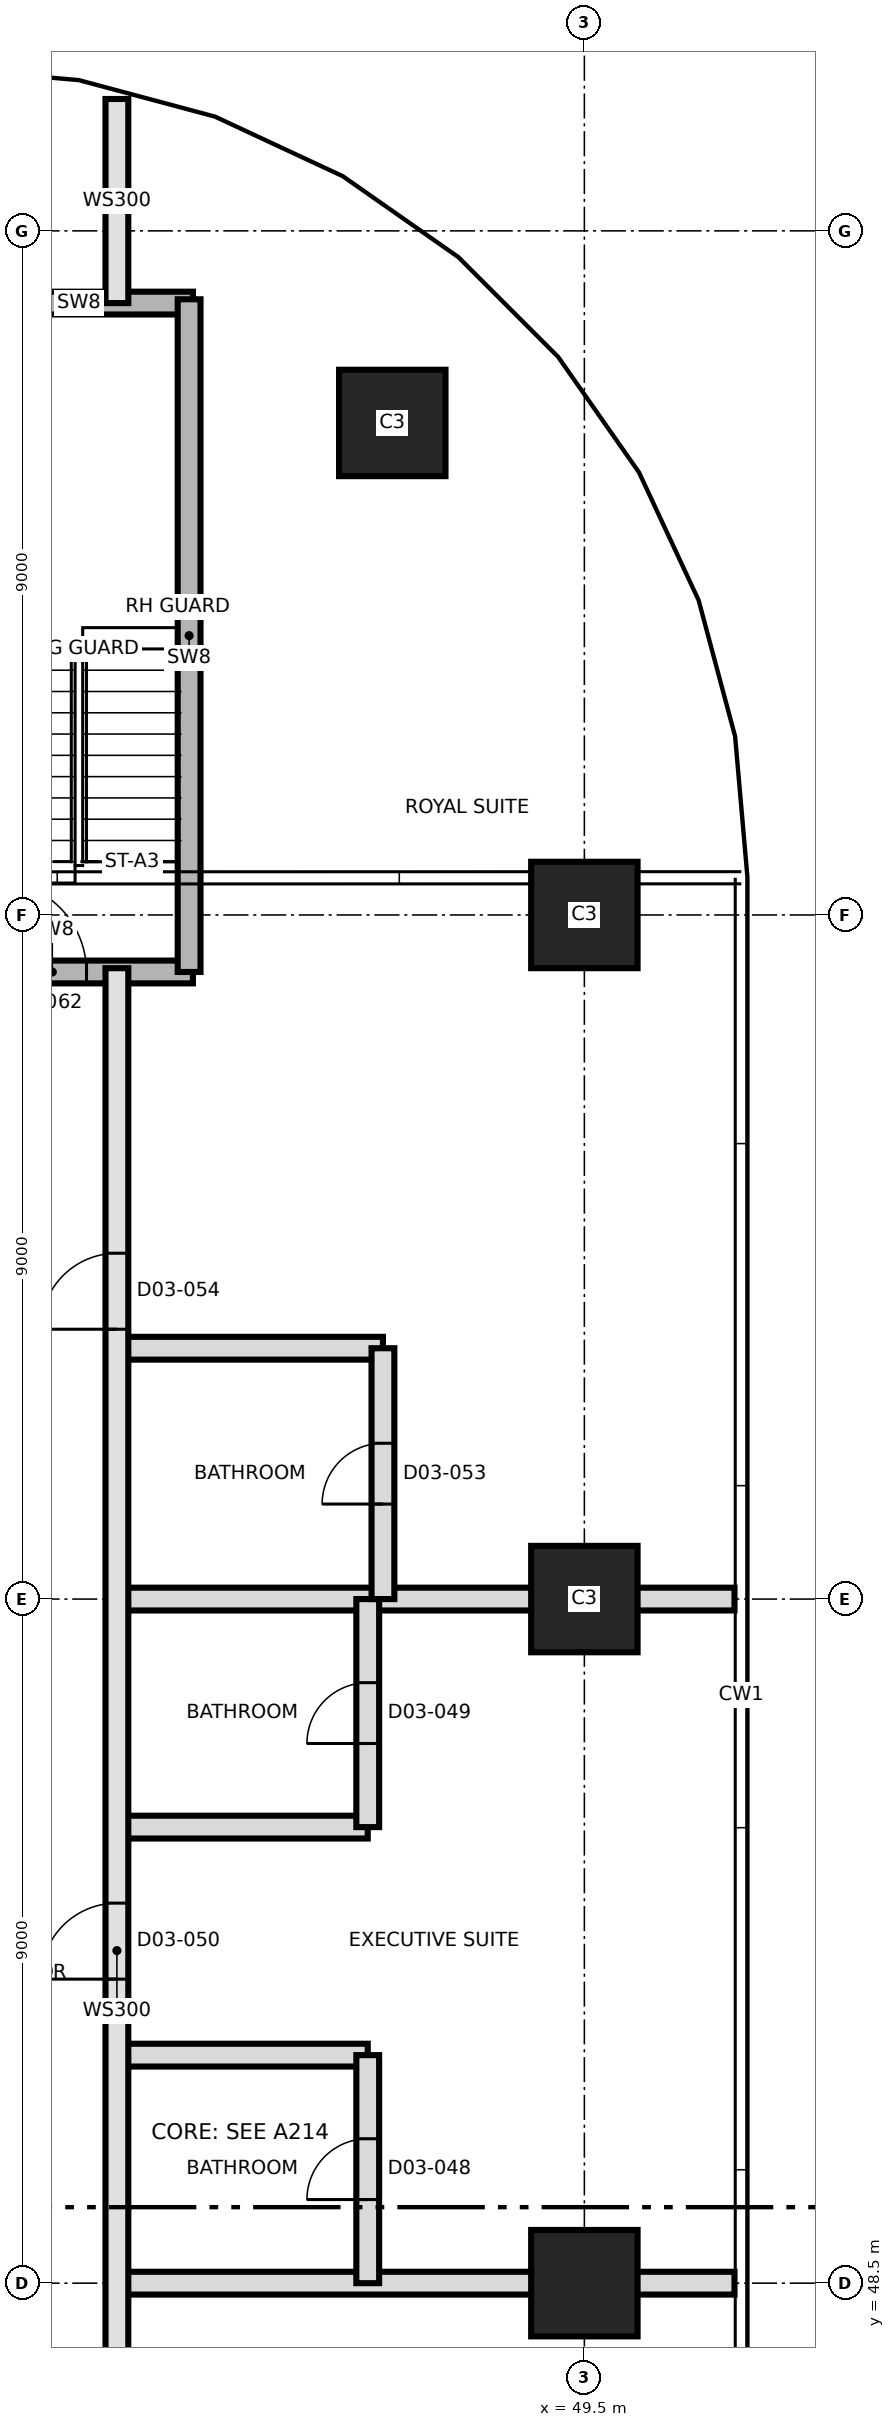
"""IFC4 building model, lengths in metres.
Left out: names, types, materials, properties, quantities, classifications, styles, units other than length and angle.
Written with IfcOpenShell. Run it as: python <this file> out.ifc"""

import sys

from ifc_helpers import new_model, si_unit, direction, frame, frame_2d, origin, origin_2d, place, context, subcontext, project, spatial, rectangle, extrude, element, fill, save


model = new_model("IFC4")
c1 = context("Model", 3, precision=1e-05, world=origin(), true_north=direction((0.0, 1.0)))
c2 = subcontext(c1, "Body", "Model", "MODEL_VIEW")
j1 = project(units=[si_unit("LENGTHUNIT", "METRE"), si_unit("PLANEANGLEUNIT", "RADIAN")], contexts=[c1])
p1 = place(None, origin())
s1 = spatial("IfcSite", under=j1, at=p1, CompositionType="ELEMENT")
p2 = place(p1, origin())
s2 = spatial("IfcBuilding", under=s1, at=p2, CompositionType="ELEMENT")
p3 = place(p2, frame((0.0, 0.0, 52.0)))
s3 = spatial("IfcBuildingStorey", under=s2, at=p3, CompositionType="ELEMENT", Elevation=52.0)
for number, where, z_axis, x_axis in (
    (1, (49.5, 48.5, 0.0), (0.0, 0.0, 1.0), (1.0, 0.0, 0.0)),
    (2, (49.5, 57.5, 0.0), (0.0, 0.0, 1.0), (1.0, 0.0, 0.0)),
    (3, (49.5, 66.5, 0.0), (0.0, 0.0, 1.0), (1.0, 0.0, 0.0)),
    (4, (46.973, 72.973, 0.0), (0.0, 0.0, 1.0), (1.0, 0.0, 0.0)),
):
    element("IfcColumn", number, at=place(p3, frame(where, z_axis=z_axis, x_axis=x_axis)), inside=s3, PredefinedType="COLUMN", context=c2, shape_type="SweptSolid", body=[
        extrude(rectangle(XDim=1.4, YDim=1.4, at=origin_2d()), origin(), (0.0, 0.0, 1.0), 3.7),
    ])
p4 = place(p3, frame((43.35, 48.5, 0.0), z_axis=(0.0, 0.0, 1.0), x_axis=(1.0, 0.0, 0.0)))
e5 = element("IfcWall", 5, at=p4, inside=s3, PredefinedType="PARTITIONING", context=c2, shape_type="SweptSolid", body=[
    extrude(rectangle(XDim=8.125, YDim=0.3, at=frame_2d((4.062, 0.0))), origin(), (0.0, 0.0, 1.0), 3.4),
])
for number, where, z_axis, x_axis in (
    (6, (43.35, 51.5, 0.0), (0.0, 0.0, 1.0), (1.0, 0.0, 0.0)),
    (7, (43.35, 54.5, 0.0), (0.0, 0.0, 1.0), (1.0, 0.0, 0.0)),
):
    element("IfcWall", number, at=place(p3, frame(where, z_axis=z_axis, x_axis=x_axis)), inside=s3, PredefinedType="PARTITIONING", context=c2, shape_type="SweptSolid", body=[
        extrude(rectangle(XDim=3.3, YDim=0.3, at=frame_2d((1.65, 0.0))), origin(), (0.0, 0.0, 1.0), 3.4),
    ])
p5 = place(p3, frame((43.35, 57.5, 0.0), z_axis=(0.0, 0.0, 1.0), x_axis=(1.0, 0.0, 0.0)))
e8 = element("IfcWall", 8, at=p5, inside=s3, PredefinedType="PARTITIONING", context=c2, shape_type="SweptSolid", body=[
    extrude(rectangle(XDim=8.125, YDim=0.3, at=frame_2d((4.062, 0.0))), origin(), (0.0, 0.0, 1.0), 3.4),
])
p6 = place(p3, frame((43.35, 60.8, 0.0), z_axis=(0.0, 0.0, 1.0), x_axis=(1.0, 0.0, 0.0)))
e9 = element("IfcWall", 9, at=p6, inside=s3, PredefinedType="PARTITIONING", context=c2, shape_type="SweptSolid", body=[
    extrude(rectangle(XDim=3.5, YDim=0.3, at=frame_2d((1.75, 0.0))), origin(), (0.0, 0.0, 1.0), 3.4),
])
p7 = place(p3, frame((40.65, 65.75, 0.0), z_axis=(0.0, 0.0, 1.0), x_axis=(1.0, 0.0, 0.0)))
e10 = element("IfcWall", 10, at=p7, inside=s3, PredefinedType="SHEAR", context=c2, shape_type="SweptSolid", body=[
    extrude(rectangle(XDim=3.7, YDim=0.3, at=frame_2d((1.85, 0.0))), origin(), (0.0, 0.0, 1.0), 3.4),
])
p8 = place(p7, frame((1.1, 0.0, 0.0)))
e11 = element("IfcOpeningElement", 11, at=p8, cuts=e10, PredefinedType="OPENING", context=c2, shape_type="SweptSolid", body=[
    extrude(rectangle(XDim=1.2, YDim=2.1, at=frame_2d((0.6, 1.05))), frame((0.0, 0.16, 0.0), z_axis=(0.0, -1.0, 0.0), x_axis=(1.0, 0.0, 0.0)), (0.0, 0.0, 1.0), 0.32),
])
p9 = place(p3, frame((41.35, 74.55, 0.0), z_axis=(0.0, 0.0, 1.0), x_axis=(1.0, 0.0, 0.0)))
e12 = element("IfcWall", 12, at=p9, inside=s3, PredefinedType="SHEAR", context=c2, shape_type="SweptSolid", body=[
    extrude(rectangle(XDim=3.0, YDim=0.3, at=frame_2d((1.5, 0.0))), origin(), (0.0, 0.0, 1.0), 3.4),
])
p10 = place(p3, frame((43.35, 39.95, 0.0), z_axis=(0.0, 0.0, 1.0), x_axis=(0.0, 1.0, 0.0)))
e13 = element("IfcWall", 13, at=p10, inside=s3, PredefinedType="SOLIDWALL", context=c2, shape_type="SweptSolid", body=[
    extrude(rectangle(XDim=25.85, YDim=0.3, at=frame_2d((12.925, 0.0))), origin(), (0.0, 0.0, 1.0), 3.4),
])
p11 = place(p10, frame((0.7, 0.0, 0.0)))
e14 = element("IfcOpeningElement", 14, at=p11, cuts=e13, PredefinedType="OPENING", context=c2, shape_type="SweptSolid", body=[
    extrude(rectangle(XDim=1.0, YDim=2.1, at=frame_2d((0.5, 1.05))), frame((0.0, 0.16, 0.0), z_axis=(0.0, -1.0, 0.0), x_axis=(1.0, 0.0, 0.0)), (0.0, 0.0, 1.0), 0.32),
])
p12 = place(p10, frame((6.55, 0.0, 0.0)))
e15 = element("IfcOpeningElement", 15, at=p12, cuts=e13, PredefinedType="OPENING", context=c2, shape_type="SweptSolid", body=[
    extrude(rectangle(XDim=1.0, YDim=2.1, at=frame_2d((0.5, 1.05))), frame((0.0, 0.16, 0.0), z_axis=(0.0, -1.0, 0.0), x_axis=(1.0, 0.0, 0.0)), (0.0, 0.0, 1.0), 0.32),
])
p13 = place(p10, frame((12.55, 0.0, 0.0)))
e16 = element("IfcOpeningElement", 16, at=p13, cuts=e13, PredefinedType="OPENING", context=c2, shape_type="SweptSolid", body=[
    extrude(rectangle(XDim=1.0, YDim=2.4, at=frame_2d((0.5, 1.2))), frame((0.0, 0.16, 0.0), z_axis=(0.0, -1.0, 0.0), x_axis=(1.0, 0.0, 0.0)), (0.0, 0.0, 1.0), 0.32),
])
p14 = place(p10, frame((21.1, 0.0, 0.0)))
e17 = element("IfcOpeningElement", 17, at=p14, cuts=e13, PredefinedType="OPENING", context=c2, shape_type="SweptSolid", body=[
    extrude(rectangle(XDim=1.0, YDim=2.4, at=frame_2d((0.5, 1.2))), frame((0.0, 0.16, 0.0), z_axis=(0.0, -1.0, 0.0), x_axis=(1.0, 0.0, 0.0)), (0.0, 0.0, 1.0), 0.32),
])
p15 = place(p3, frame((43.35, 74.55, 0.0), z_axis=(0.0, 0.0, 1.0), x_axis=(0.0, 1.0, 0.0)))
e18 = element("IfcWall", 18, at=p15, inside=s3, PredefinedType="SOLIDWALL", context=c2, shape_type="SweptSolid", body=[
    extrude(rectangle(XDim=2.685, YDim=0.3, at=frame_2d((1.343, 0.0))), origin(), (0.0, 0.0, 1.0), 3.4),
])
p16 = place(p3, frame((44.3, 65.75, 0.0), z_axis=(0.0, 0.0, 1.0), x_axis=(0.0, 1.0, 0.0)))
e19 = element("IfcWall", 19, at=p16, inside=s3, PredefinedType="SHEAR", context=c2, shape_type="SweptSolid", body=[
    extrude(rectangle(XDim=8.85, YDim=0.3, at=frame_2d((4.425, 0.0))), origin(), (0.0, 0.0, 1.0), 3.4),
])
p17 = place(p3, frame((46.65, 48.5, 0.0), z_axis=(0.0, 0.0, 1.0), x_axis=(0.0, 1.0, 0.0)))
e20 = element("IfcWall", 20, at=p17, inside=s3, PredefinedType="PARTITIONING", context=c2, shape_type="SweptSolid", body=[
    extrude(rectangle(XDim=3.0, YDim=0.3, at=frame_2d((1.5, 0.0))), origin(), (0.0, 0.0, 1.0), 3.4),
])
p18 = place(p17, frame((1.1, 0.0, 0.0)))
e21 = element("IfcOpeningElement", 21, at=p18, cuts=e20, PredefinedType="OPENING", context=c2, shape_type="SweptSolid", body=[
    extrude(rectangle(XDim=0.8, YDim=2.1, at=frame_2d((0.4, 1.05))), frame((0.0, 0.16, 0.0), z_axis=(0.0, -1.0, 0.0), x_axis=(1.0, 0.0, 0.0)), (0.0, 0.0, 1.0), 0.32),
])
p19 = place(p3, frame((46.65, 54.5, 0.0), z_axis=(0.0, 0.0, 1.0), x_axis=(0.0, 1.0, 0.0)))
e22 = element("IfcWall", 22, at=p19, inside=s3, PredefinedType="PARTITIONING", context=c2, shape_type="SweptSolid", body=[
    extrude(rectangle(XDim=3.0, YDim=0.3, at=frame_2d((1.5, 0.0))), origin(), (0.0, 0.0, 1.0), 3.4),
])
p20 = place(p19, frame((1.1, 0.0, 0.0)))
e23 = element("IfcOpeningElement", 23, at=p20, cuts=e22, PredefinedType="OPENING", context=c2, shape_type="SweptSolid", body=[
    extrude(rectangle(XDim=0.8, YDim=2.1, at=frame_2d((0.4, 1.05))), frame((0.0, 0.16, 0.0), z_axis=(0.0, -1.0, 0.0), x_axis=(1.0, 0.0, 0.0)), (0.0, 0.0, 1.0), 0.32),
])
p21 = place(p3, frame((46.85, 57.5, 0.0), z_axis=(0.0, 0.0, 1.0), x_axis=(0.0, 1.0, 0.0)))
e24 = element("IfcWall", 24, at=p21, inside=s3, PredefinedType="PARTITIONING", context=c2, shape_type="SweptSolid", body=[
    extrude(rectangle(XDim=3.3, YDim=0.3, at=frame_2d((1.65, 0.0))), origin(), (0.0, 0.0, 1.0), 3.4),
])
p22 = place(p21, frame((1.25, 0.0, 0.0)))
e25 = element("IfcOpeningElement", 25, at=p22, cuts=e24, PredefinedType="OPENING", context=c2, shape_type="SweptSolid", body=[
    extrude(rectangle(XDim=0.8, YDim=2.1, at=frame_2d((0.4, 1.05))), frame((0.0, 0.16, 0.0), z_axis=(0.0, -1.0, 0.0), x_axis=(1.0, 0.0, 0.0)), (0.0, 0.0, 1.0), 0.32),
])
p23 = place(p18, origin())
e26 = element("IfcDoor", 26, at=p23, inside=s3, OperationType="SINGLE_SWING_RIGHT", PredefinedType="DOOR", context=c2, shape_type="SweptSolid", body=[
    extrude(rectangle(XDim=0.8, YDim=2.1, at=frame_2d((0.4, 1.05))), frame((0.0, 0.025, 0.0), z_axis=(0.0, -1.0, 0.0), x_axis=(1.0, 0.0, 0.0)), (0.0, 0.0, 1.0), 0.05),
])
fill(e21, e26)
p24 = place(p20, origin())
e27 = element("IfcDoor", 27, at=p24, inside=s3, OperationType="SINGLE_SWING_LEFT", PredefinedType="DOOR", context=c2, shape_type="SweptSolid", body=[
    extrude(rectangle(XDim=0.8, YDim=2.1, at=frame_2d((0.4, 1.05))), frame((0.0, 0.025, 0.0), z_axis=(0.0, -1.0, 0.0), x_axis=(1.0, 0.0, 0.0)), (0.0, 0.0, 1.0), 0.05),
])
fill(e23, e27)
p25 = place(p13, origin())
e28 = element("IfcDoor", 28, at=p25, inside=s3, OperationType="SINGLE_SWING_LEFT", PredefinedType="DOOR", context=c2, shape_type="SweptSolid", body=[
    extrude(rectangle(XDim=1.0, YDim=2.4, at=frame_2d((0.5, 1.2))), frame((0.0, 0.025, 0.0), z_axis=(0.0, -1.0, 0.0), x_axis=(1.0, 0.0, 0.0)), (0.0, 0.0, 1.0), 0.05),
])
fill(e16, e28)
p26 = place(p22, origin())
e29 = element("IfcDoor", 29, at=p26, inside=s3, OperationType="SINGLE_SWING_LEFT", PredefinedType="DOOR", context=c2, shape_type="SweptSolid", body=[
    extrude(rectangle(XDim=0.8, YDim=2.1, at=frame_2d((0.4, 1.05))), frame((0.0, 0.025, 0.0), z_axis=(0.0, -1.0, 0.0), x_axis=(1.0, 0.0, 0.0)), (0.0, 0.0, 1.0), 0.05),
])
fill(e25, e29)
p27 = place(p14, origin())
e30 = element("IfcDoor", 30, at=p27, inside=s3, OperationType="SINGLE_SWING_LEFT", PredefinedType="DOOR", context=c2, shape_type="SweptSolid", body=[
    extrude(rectangle(XDim=1.0, YDim=2.4, at=frame_2d((0.5, 1.2))), frame((0.0, 0.025, 0.0), z_axis=(0.0, -1.0, 0.0), x_axis=(1.0, 0.0, 0.0)), (0.0, 0.0, 1.0), 0.05),
])
fill(e17, e30)
p28 = place(p8, origin())
e31 = element("IfcDoor", 31, at=p28, inside=s3, OperationType="SINGLE_SWING_RIGHT", PredefinedType="DOOR", context=c2, shape_type="SweptSolid", body=[
    extrude(rectangle(XDim=1.2, YDim=2.1, at=frame_2d((0.6, 1.05))), frame((0.0, 0.025, 0.0), z_axis=(0.0, -1.0, 0.0), x_axis=(1.0, 0.0, 0.0)), (0.0, 0.0, 1.0), 0.05),
])
fill(e11, e31)
save(model, sys.argv[1])
